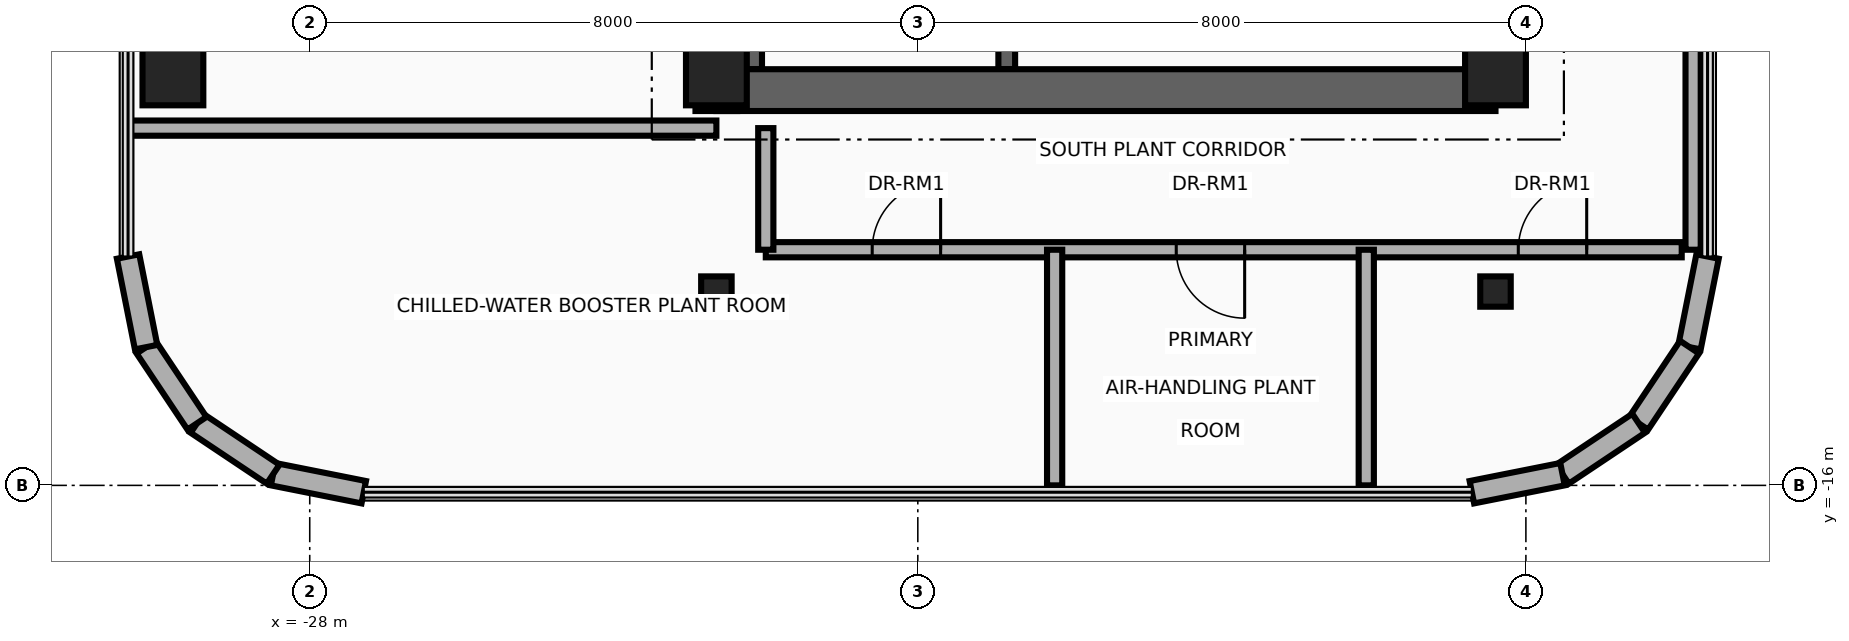
"""IFC4 building model, lengths in metres.
Left out: names, types, materials, properties, quantities, classifications, styles, units other than length and angle.
Written with IfcOpenShell. Run it as: python <this file> out.ifc"""

import sys

from ifc_helpers import new_model, si_unit, direction, frame, frame_2d, origin, origin_2d, place, context, subcontext, project, spatial, rectangle, i_section, extrude, source, transform, mapped, element, fill, save


model = new_model("IFC4")
c1 = context("Model", 3, precision=1e-05, world=origin(), true_north=direction((0.0, 1.0)))
c2 = subcontext(c1, "Body", "Model", "MODEL_VIEW")
j1 = project(units=[si_unit("LENGTHUNIT", "METRE"), si_unit("PLANEANGLEUNIT", "RADIAN")], contexts=[c1])
p1 = place(None, origin())
s1 = spatial("IfcSite", under=j1, at=p1, CompositionType="ELEMENT")
p2 = place(p1, origin())
s2 = spatial("IfcBuilding", under=s1, at=p2, CompositionType="ELEMENT")
p3 = place(p2, frame((0.0, 0.0, 261.5)))
s3 = spatial("IfcBuildingStorey", under=s2, at=p3, CompositionType="ELEMENT", Elevation=261.5)
for number, where, z_axis, x_axis in (
    (1, (-22.16, -10.525, 0.0), (0.0, 0.0, 1.0), (0.0, 1.0, 0.0)),
    (2, (-18.83, -10.525, 0.0), (0.0, 0.0, 1.0), (0.0, 1.0, 0.0)),
):
    element("IfcWall", number, at=place(p3, frame(where, z_axis=z_axis, x_axis=x_axis)), inside=s3, PredefinedType="SHEAR", context=c2, shape_type="SweptSolid", body=[
        extrude(rectangle(XDim=8.745, YDim=0.22, at=frame_2d((4.373, 0.0))), origin(), (0.0, 0.0, 1.0), 4.26),
    ])
p4 = place(p3, frame((-22.65, -11.075, 0.0), z_axis=(0.0, 0.0, 1.0), x_axis=(0.0, 1.0, 0.0)))
e3 = element("IfcWall", 3, at=p4, inside=s3, PredefinedType="SHEAR", context=c2, shape_type="SweptSolid", body=[
    extrude(rectangle(XDim=22.15, YDim=0.55, at=frame_2d((11.075, 0.0))), origin(), (0.0, 0.0, 1.0), 4.26),
])
p5 = place(p3, frame((-22.65, -10.8, 0.0), z_axis=(0.0, 0.0, 1.0), x_axis=(1.0, 0.0, 0.0)))
e4 = element("IfcWall", 4, at=p5, inside=s3, PredefinedType="SHEAR", context=c2, shape_type="SweptSolid", body=[
    extrude(rectangle(XDim=10.25, YDim=0.55, at=frame_2d((5.125, 0.0))), origin(), (0.0, 0.0, 1.0), 4.26),
])
m1 = source(origin(), c2, "Body", "SweptSolid", [
    extrude(rectangle(XDim=0.8, YDim=0.8, at=origin_2d()), origin(), (0.0, 0.0, 1.0), 4.5),
])
for number, where, z_axis, x_axis in (
    (5, (-29.8, -10.6, 0.0), (0.0, 0.0, 1.0), (1.0, 0.0, 0.0)),
    (6, (-22.65, -10.6, 0.0), (0.0, 0.0, 1.0), (1.0, 0.0, 0.0)),
    (7, (-12.4, -10.6, 0.0), (0.0, 0.0, 1.0), (1.0, 0.0, 0.0)),
):
    element("IfcColumn", number, at=place(p3, frame(where, z_axis=z_axis, x_axis=x_axis)), inside=s3, PredefinedType="COLUMN", context=c2, shape_type="MappedRepresentation", body=[
        mapped(m1, transform((0.0, 0.0, 0.0), x_axis=(1.0, 0.0, 0.0), y_axis=(0.0, 1.0, 0.0), z_axis=(0.0, 0.0, 1.0), scale=1.0)),
    ])
m2 = source(origin(), c2, "Body", "SweptSolid", [
    extrude(i_section(OverallWidth=0.401, OverallDepth=0.399, WebThickness=0.025, FlangeThickness=0.04, at=origin_2d()), origin(), (0.0, 0.0, 1.0), 4.5),
])
for number, where, z_axis, x_axis in (
    (8, (-22.65, -13.45, 0.0), (0.0, 0.0, 1.0), (1.0, 0.0, 0.0)),
    (9, (-12.4, -13.45, 0.0), (0.0, 0.0, 1.0), (1.0, 0.0, 0.0)),
):
    element("IfcColumn", number, at=place(p3, frame(where, z_axis=z_axis, x_axis=x_axis)), inside=s3, PredefinedType="COLUMN", context=c2, shape_type="MappedRepresentation", body=[
        mapped(m2, transform((0.0, 0.0, 0.0), x_axis=(1.0, 0.0, 0.0), y_axis=(0.0, 1.0, 0.0), z_axis=(0.0, 0.0, 1.0), scale=1.0)),
    ])
p6 = place(p3, frame((-9.61, -12.989, 0.0), z_axis=(0.0, 0.0, 1.0), x_axis=(-0.194996050505, -0.980804027463, 0.0)))
e10 = element("IfcWall", 10, at=p6, inside=s3, PredefinedType="SOLIDWALL", context=c2, shape_type="SweptSolid", body=[
    extrude(rectangle(XDim=1.216, YDim=0.3, at=frame_2d((0.608, 0.0))), origin(), (0.0, 0.0, 1.0), 4.26),
])
for number, where, z_axis, x_axis in (
    (11, (-9.847, -14.182, 0.0), (0.0, 0.0, 1.0), (-0.556, -0.831, 0.0)),
    (12, (-10.517, -15.183, 0.0), (0.0, 0.0, 1.0), (-0.831, -0.556, 0.0)),
):
    element("IfcWall", number, at=place(p3, frame(where, z_axis=z_axis, x_axis=x_axis)), inside=s3, PredefinedType="SOLIDWALL", context=c2, shape_type="SweptSolid", body=[
        extrude(rectangle(XDim=1.205, YDim=0.3, at=frame_2d((0.603, 0.0))), origin(), (0.0, 0.0, 1.0), 4.26),
    ])
for number, where, z_axis, x_axis in (
    (13, (-11.518, -15.853, 0.0), (0.0, 0.0, 1.0), (-0.981, -0.195, 0.0)),
    (14, (-27.289, -16.09, 0.0), (0.0, 0.0, 1.0), (-0.981, 0.195, 0.0)),
):
    element("IfcWall", number, at=place(p3, frame(where, z_axis=z_axis, x_axis=x_axis)), inside=s3, PredefinedType="SOLIDWALL", context=c2, shape_type="SweptSolid", body=[
        extrude(rectangle(XDim=1.216, YDim=0.3, at=frame_2d((0.608, 0.0))), origin(), (0.0, 0.0, 1.0), 4.26),
    ])
for number, where, z_axis, x_axis in (
    (15, (-28.482, -15.853, 0.0), (0.0, 0.0, 1.0), (-0.831, 0.556, 0.0)),
    (16, (-29.483, -15.183, 0.0), (0.0, 0.0, 1.0), (-0.556, 0.831, 0.0)),
):
    element("IfcWall", number, at=place(p3, frame(where, z_axis=z_axis, x_axis=x_axis)), inside=s3, PredefinedType="SOLIDWALL", context=c2, shape_type="SweptSolid", body=[
        extrude(rectangle(XDim=1.205, YDim=0.3, at=frame_2d((0.603, 0.0))), origin(), (0.0, 0.0, 1.0), 4.26),
    ])
p7 = place(p3, frame((-30.153, -14.182, 0.0), z_axis=(0.0, 0.0, 1.0), x_axis=(-0.194996050505, 0.980804027463, 0.0)))
e17 = element("IfcWall", 17, at=p7, inside=s3, PredefinedType="SOLIDWALL", context=c2, shape_type="SweptSolid", body=[
    extrude(rectangle(XDim=1.216, YDim=0.3, at=frame_2d((0.608, 0.0))), origin(), (0.0, 0.0, 1.0), 4.26),
])
p8 = place(p3, frame((-30.39, -11.3, 0.0), z_axis=(0.0, 0.0, 1.0), x_axis=(1.0, 0.0, 0.0)))
e18 = element("IfcWall", 18, at=p8, inside=s3, PredefinedType="PARTITIONING", context=c2, shape_type="SweptSolid", body=[
    extrude(rectangle(XDim=7.74, YDim=0.2, at=frame_2d((3.87, 0.0))), origin(), (0.0, 0.0, 1.0), 3.634),
])
p9 = place(p3, frame((-22.0, -12.9, 0.0), z_axis=(0.0, 0.0, 1.0), x_axis=(1.0, 0.0, 0.0)))
e19 = element("IfcWall", 19, at=p9, inside=s3, PredefinedType="PARTITIONING", context=c2, shape_type="SweptSolid", body=[
    extrude(rectangle(XDim=12.05, YDim=0.2, at=frame_2d((6.025, 0.0))), origin(), (0.0, 0.0, 1.0), 3.634),
])
p10 = place(p9, frame((1.4, 0.0, 0.0)))
e20 = element("IfcOpeningElement", 20, at=p10, cuts=e19, PredefinedType="OPENING", context=c2, shape_type="SweptSolid", body=[
    extrude(rectangle(XDim=0.9, YDim=2.1, at=frame_2d((0.45, 1.05))), frame((0.0, 0.115, 0.0), z_axis=(0.0, -1.0, 0.0), x_axis=(1.0, 0.0, 0.0)), (0.0, 0.0, 1.0), 0.23),
])
p11 = place(p9, frame((5.4, 0.0, 0.0)))
e21 = element("IfcOpeningElement", 21, at=p11, cuts=e19, PredefinedType="OPENING", context=c2, shape_type="SweptSolid", body=[
    extrude(rectangle(XDim=0.9, YDim=2.1, at=frame_2d((0.45, 1.05))), frame((0.0, 0.115, 0.0), z_axis=(0.0, -1.0, 0.0), x_axis=(1.0, 0.0, 0.0)), (0.0, 0.0, 1.0), 0.23),
])
p12 = place(p9, frame((9.9, 0.0, 0.0)))
e22 = element("IfcOpeningElement", 22, at=p12, cuts=e19, PredefinedType="OPENING", context=c2, shape_type="SweptSolid", body=[
    extrude(rectangle(XDim=0.9, YDim=2.1, at=frame_2d((0.45, 1.05))), frame((0.0, 0.115, 0.0), z_axis=(0.0, -1.0, 0.0), x_axis=(1.0, 0.0, 0.0)), (0.0, 0.0, 1.0), 0.23),
])
for number, where, z_axis, x_axis in (
    (23, (-18.2, -16.0, 0.0), (0.0, 0.0, 1.0), (0.0, 1.0, 0.0)),
    (24, (-14.1, -16.0, 0.0), (0.0, 0.0, 1.0), (0.0, 1.0, 0.0)),
):
    element("IfcWall", number, at=place(p3, frame(where, z_axis=z_axis, x_axis=x_axis)), inside=s3, PredefinedType="PARTITIONING", context=c2, shape_type="SweptSolid", body=[
        extrude(rectangle(XDim=3.1, YDim=0.2, at=frame_2d((1.55, 0.0))), origin(), (0.0, 0.0, 1.0), 3.706),
    ])
p13 = place(p3, frame((-22.0, -12.9, 0.0), z_axis=(0.0, 0.0, 1.0), x_axis=(0.0, 1.0, 0.0)))
e25 = element("IfcWall", 25, at=p13, inside=s3, PredefinedType="PARTITIONING", context=c2, shape_type="SweptSolid", body=[
    extrude(rectangle(XDim=1.6, YDim=0.2, at=frame_2d((0.8, 0.0))), origin(), (0.0, 0.0, 1.0), 3.839),
])
p14 = place(p3, frame((-9.8, -12.9, 0.0), z_axis=(0.0, 0.0, 1.0), x_axis=(0.0, 1.0, 0.0)))
e26 = element("IfcWall", 26, at=p14, inside=s3, PredefinedType="PARTITIONING", context=c2, shape_type="SweptSolid", body=[
    extrude(rectangle(XDim=24.32, YDim=0.2, at=frame_2d((12.16, 0.0))), origin(), (0.0, 0.0, 1.0), 4.26),
])
p15 = place(p10, origin())
e27 = element("IfcDoor", 27, at=p15, inside=s3, OperationType="SINGLE_SWING_RIGHT", PredefinedType="DOOR", context=c2, shape_type="SweptSolid", body=[
    extrude(rectangle(XDim=0.9, YDim=2.1, at=frame_2d((0.45, 1.05))), frame((0.0, 0.025, 0.0), z_axis=(0.0, -1.0, 0.0), x_axis=(1.0, 0.0, 0.0)), (0.0, 0.0, 1.0), 0.05),
])
fill(e20, e27)
p16 = place(p11, frame((0.9, 0.0, 0.0), z_axis=(0.0, 0.0, 1.0), x_axis=(-1.0, 0.0, 0.0)))
e28 = element("IfcDoor", 28, at=p16, inside=s3, OperationType="SINGLE_SWING_LEFT", PredefinedType="DOOR", context=c2, shape_type="SweptSolid", body=[
    extrude(rectangle(XDim=0.9, YDim=2.1, at=frame_2d((0.45, 1.05))), frame((0.0, 0.025, 0.0), z_axis=(0.0, -1.0, 0.0), x_axis=(1.0, 0.0, 0.0)), (0.0, 0.0, 1.0), 0.05),
])
fill(e21, e28)
p17 = place(p12, origin())
e29 = element("IfcDoor", 29, at=p17, inside=s3, OperationType="SINGLE_SWING_RIGHT", PredefinedType="DOOR", context=c2, shape_type="SweptSolid", body=[
    extrude(rectangle(XDim=0.9, YDim=2.1, at=frame_2d((0.45, 1.05))), frame((0.0, 0.025, 0.0), z_axis=(0.0, -1.0, 0.0), x_axis=(1.0, 0.0, 0.0)), (0.0, 0.0, 1.0), 0.05),
])
fill(e22, e29)
save(model, sys.argv[1])
